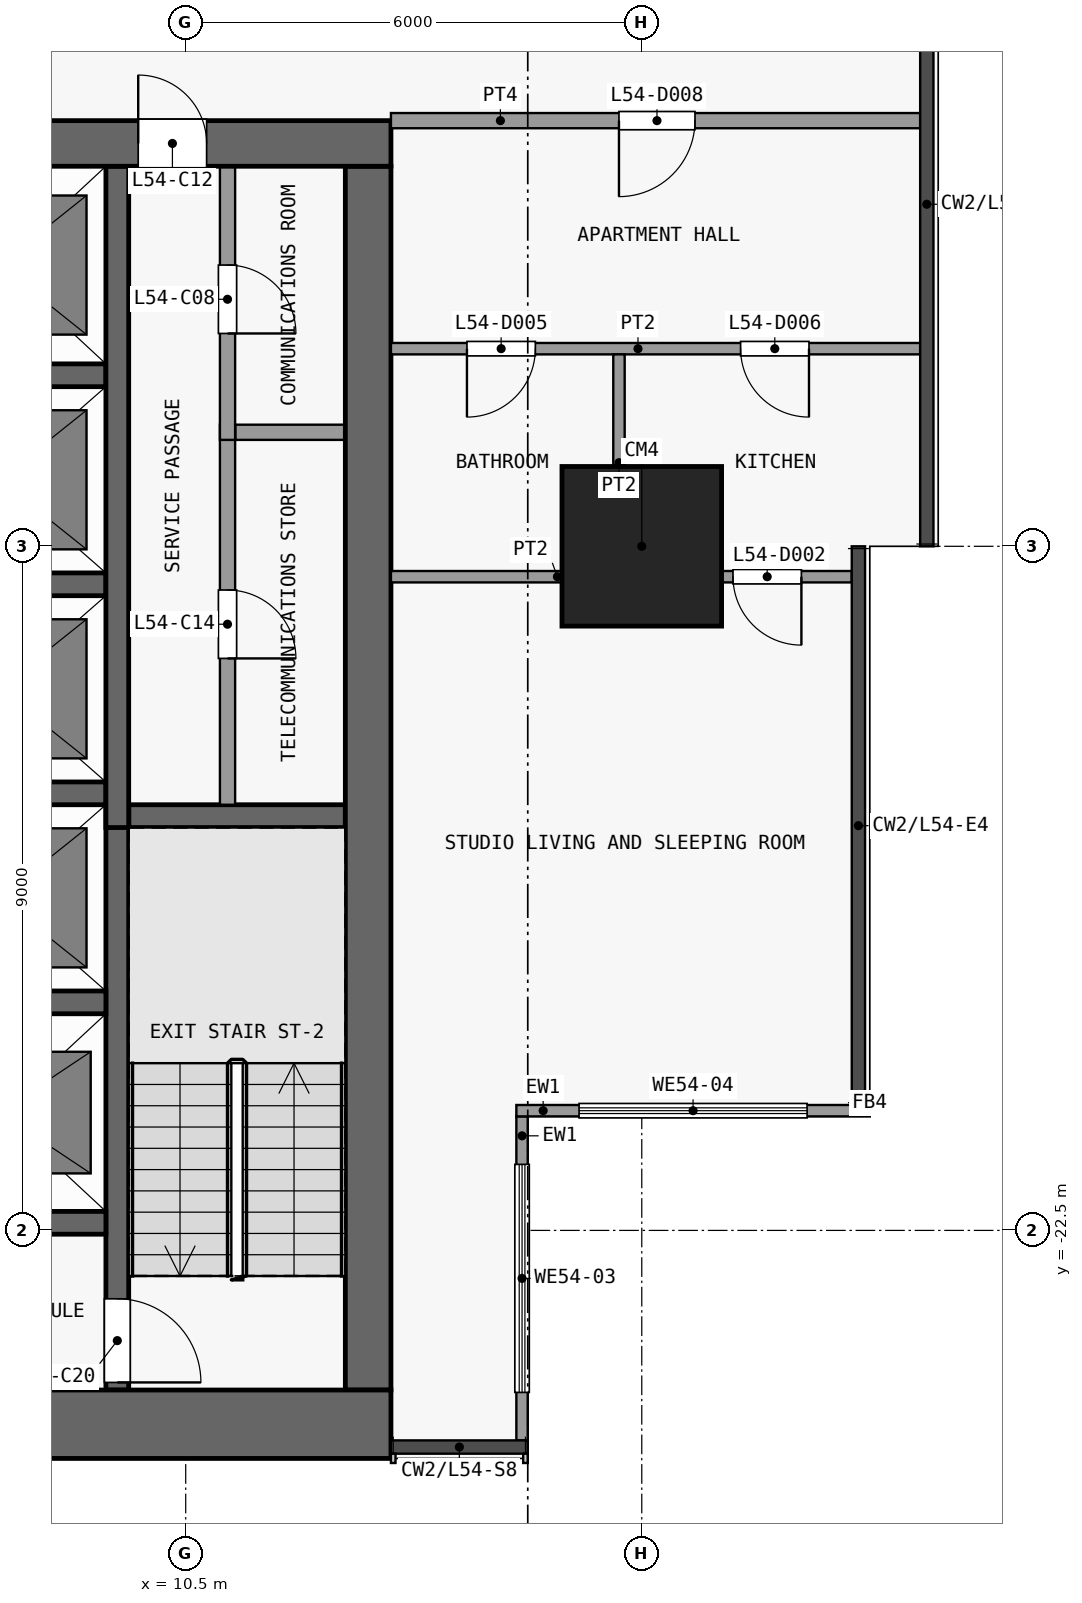
"""IFC4 building model, lengths in metres.
Left out: names, types, materials, properties, quantities, classifications, styles, units other than length and angle.
Written with IfcOpenShell. Run it as: python <this file> out.ifc"""

import sys

from ifc_helpers import new_model, si_unit, direction, frame, frame_2d, origin, origin_2d, place, context, subcontext, project, spatial, rectangle, extrude, element, fill, save


model = new_model("IFC4")
c1 = context("Model", 3, precision=1e-05, world=origin(), true_north=direction((0.0, 1.0)))
c2 = subcontext(c1, "Body", "Model", "MODEL_VIEW")
j1 = project(units=[si_unit("LENGTHUNIT", "METRE"), si_unit("PLANEANGLEUNIT", "RADIAN")], contexts=[c1])
p1 = place(None, origin())
s1 = spatial("IfcSite", under=j1, at=p1, CompositionType="ELEMENT")
p2 = place(p1, origin())
s2 = spatial("IfcBuilding", under=s1, at=p2, CompositionType="ELEMENT")
p3 = place(p2, frame((0.0, 0.0, 215.9)))
s3 = spatial("IfcBuildingStorey", under=s2, at=p3, CompositionType="ELEMENT", Elevation=215.9)
p4 = place(p3, frame((16.5, -13.5, 0.0), z_axis=(0.0, 0.0, 1.0), x_axis=(1.0, 0.0, 0.0)))
e1 = element("IfcColumn", 1, at=p4, inside=s3, PredefinedType="COLUMN", context=c2, shape_type="SweptSolid", body=[
    extrude(rectangle(XDim=2.1, YDim=2.1, at=origin_2d()), origin(), (0.0, 0.0, 1.0), 3.6),
])
p5 = place(p3, frame((-13.2, -25.05, 0.0), z_axis=(0.0, 0.0, 1.0), x_axis=(1.0, 0.0, 0.0)))
e2 = element("IfcWall", 2, at=p5, inside=s3, PredefinedType="SHEAR", context=c2, shape_type="SweptSolid", body=[
    extrude(rectangle(XDim=26.4, YDim=0.9, at=frame_2d((13.2, 0.0))), origin(), (0.0, 0.0, 1.0), 3.3),
])
p6 = place(p3, frame((-13.2, -8.2, 0.0), z_axis=(0.0, 0.0, 1.0), x_axis=(1.0, 0.0, 0.0)))
e3 = element("IfcWall", 3, at=p6, inside=s3, PredefinedType="SHEAR", context=c2, shape_type="SweptSolid", body=[
    extrude(rectangle(XDim=26.4, YDim=0.6, at=frame_2d((13.2, 0.0))), origin(), (0.0, 0.0, 1.0), 3.3),
])
p7 = place(p6, frame((7.5, 0.0, 0.0)))
e4 = element("IfcOpeningElement", 4, at=p7, cuts=e3, PredefinedType="OPENING", context=c2, shape_type="SweptSolid", body=[
    extrude(rectangle(XDim=1.8, YDim=2.1, at=frame_2d((0.9, 1.05))), frame((0.0, 0.31, 0.0), z_axis=(0.0, -1.0, 0.0), x_axis=(1.0, 0.0, 0.0)), (0.0, 0.0, 1.0), 0.62),
])
p8 = place(p6, frame((17.1, 0.0, 0.0)))
e5 = element("IfcOpeningElement", 5, at=p8, cuts=e3, PredefinedType="OPENING", context=c2, shape_type="SweptSolid", body=[
    extrude(rectangle(XDim=1.8, YDim=2.1, at=frame_2d((0.9, 1.05))), frame((0.0, 0.31, 0.0), z_axis=(0.0, -1.0, 0.0), x_axis=(1.0, 0.0, 0.0)), (0.0, 0.0, 1.0), 0.62),
])
p9 = place(p6, frame((2.425, 0.0, 0.0)))
e6 = element("IfcOpeningElement", 6, at=p9, cuts=e3, PredefinedType="OPENING", context=c2, shape_type="SweptSolid", body=[
    extrude(rectangle(XDim=0.9, YDim=2.1, at=frame_2d((0.45, 1.05))), frame((0.0, 0.31, 0.0), z_axis=(0.0, -1.0, 0.0), x_axis=(1.0, 0.0, 0.0)), (0.0, 0.0, 1.0), 0.62),
])
p10 = place(p6, frame((23.075, 0.0, 0.0)))
e7 = element("IfcOpeningElement", 7, at=p10, cuts=e3, PredefinedType="OPENING", context=c2, shape_type="SweptSolid", body=[
    extrude(rectangle(XDim=0.9, YDim=2.1, at=frame_2d((0.45, 1.05))), frame((0.0, 0.31, 0.0), z_axis=(0.0, -1.0, 0.0), x_axis=(1.0, 0.0, 0.0)), (0.0, 0.0, 1.0), 0.62),
])
p11 = place(p3, frame((12.9, -24.6, 0.0), z_axis=(0.0, 0.0, 1.0), x_axis=(0.0, 1.0, 0.0)))
e8 = element("IfcWall", 8, at=p11, inside=s3, PredefinedType="SHEAR", context=c2, shape_type="SweptSolid", body=[
    extrude(rectangle(XDim=16.1, YDim=0.6, at=frame_2d((8.05, 0.0))), origin(), (0.0, 0.0, 1.0), 3.3),
])
for number, where, z_axis, x_axis in (
    (9, (6.65, -22.4, 0.0), (0.0, 0.0, 1.0), (1.0, 0.0, 0.0)),
    (10, (6.65, -19.5, 0.0), (0.0, 0.0, 1.0), (1.0, 0.0, 0.0)),
):
    element("IfcWall", number, at=place(p3, frame(where, z_axis=z_axis, x_axis=x_axis)), inside=s3, PredefinedType="SHEAR", context=c2, shape_type="SweptSolid", body=[
        extrude(rectangle(XDim=2.8, YDim=0.3, at=frame_2d((1.4, 0.0))), origin(), (0.0, 0.0, 1.0), 3.3),
    ])
p12 = place(p3, frame((9.75, -17.05, 0.0), z_axis=(0.0, 0.0, 1.0), x_axis=(1.0, 0.0, 0.0)))
e11 = element("IfcWall", 11, at=p12, inside=s3, PredefinedType="SHEAR", context=c2, shape_type="SweptSolid", body=[
    extrude(rectangle(XDim=2.85, YDim=0.3, at=frame_2d((1.425, 0.0))), origin(), (0.0, 0.0, 1.0), 3.3),
])
for number, where, z_axis, x_axis in (
    (12, (6.65, -16.75, 0.0), (0.0, 0.0, 1.0), (1.0, 0.0, 0.0)),
    (13, (6.65, -14.0, 0.0), (0.0, 0.0, 1.0), (1.0, 0.0, 0.0)),
):
    element("IfcWall", number, at=place(p3, frame(where, z_axis=z_axis, x_axis=x_axis)), inside=s3, PredefinedType="SHEAR", context=c2, shape_type="SweptSolid", body=[
        extrude(rectangle(XDim=2.8, YDim=0.3, at=frame_2d((1.4, 0.0))), origin(), (0.0, 0.0, 1.0), 3.3),
    ])
p13 = place(p3, frame((11.15, -12.0, 0.0), z_axis=(0.0, 0.0, 1.0), x_axis=(1.0, 0.0, 0.0)))
e14 = element("IfcWall", 14, at=p13, inside=s3, PredefinedType="PARTITIONING", context=c2, shape_type="SweptSolid", body=[
    extrude(rectangle(XDim=1.45, YDim=0.2, at=frame_2d((0.725, 0.0))), origin(), (0.0, 0.0, 1.0), 3.3),
])
p14 = place(p3, frame((6.65, -11.25, 0.0), z_axis=(0.0, 0.0, 1.0), x_axis=(1.0, 0.0, 0.0)))
e15 = element("IfcWall", 15, at=p14, inside=s3, PredefinedType="SHEAR", context=c2, shape_type="SweptSolid", body=[
    extrude(rectangle(XDim=2.8, YDim=0.3, at=frame_2d((1.4, 0.0))), origin(), (0.0, 0.0, 1.0), 3.3),
])
p15 = place(p3, frame((9.6, -16.9, 0.0), z_axis=(0.0, 0.0, 1.0), x_axis=(0.0, -1.0, 0.0)))
e16 = element("IfcWall", 16, at=p15, inside=s3, PredefinedType="SHEAR", context=c2, shape_type="SweptSolid", body=[
    extrude(rectangle(XDim=7.7, YDim=0.3, at=frame_2d((3.85, 0.0))), origin(), (0.0, 0.0, 1.0), 3.3),
])
p16 = place(p15, frame((6.5, 0.0, 0.0)))
e17 = element("IfcOpeningElement", 17, at=p16, cuts=e16, PredefinedType="OPENING", context=c2, shape_type="SweptSolid", body=[
    extrude(rectangle(XDim=1.1, YDim=2.1, at=frame_2d((0.55, 1.05))), frame((0.0, 0.16, 0.0), z_axis=(0.0, -1.0, 0.0), x_axis=(1.0, 0.0, 0.0)), (0.0, 0.0, 1.0), 0.32),
])
p17 = place(p3, frame((9.6, -17.2, 0.0), z_axis=(0.0, 0.0, 1.0), x_axis=(0.0, 1.0, 0.0)))
e18 = element("IfcWall", 18, at=p17, inside=s3, PredefinedType="SHEAR", context=c2, shape_type="SweptSolid", body=[
    extrude(rectangle(XDim=8.7, YDim=0.3, at=frame_2d((4.35, 0.0))), origin(), (0.0, 0.0, 1.0), 3.3),
])
p18 = place(p3, frame((11.05, -11.9, 0.0), z_axis=(0.0, 0.0, 1.0), x_axis=(0.0, -1.0, 0.0)))
e19 = element("IfcWall", 19, at=p18, inside=s3, PredefinedType="PARTITIONING", context=c2, shape_type="SweptSolid", body=[
    extrude(rectangle(XDim=5.0, YDim=0.2, at=frame_2d((2.5, 0.0))), origin(), (0.0, 0.0, 1.0), 3.3),
])
p19 = place(p18, frame((2.175, 0.0, 0.0)))
e20 = element("IfcOpeningElement", 20, at=p19, cuts=e19, PredefinedType="OPENING", context=c2, shape_type="SweptSolid", body=[
    extrude(rectangle(XDim=0.9, YDim=2.1, at=frame_2d((0.45, 1.05))), frame((0.0, 0.11, 0.0), z_axis=(0.0, -1.0, 0.0), x_axis=(1.0, 0.0, 0.0)), (0.0, 0.0, 1.0), 0.22),
])
p20 = place(p3, frame((11.05, -8.5, 0.0), z_axis=(0.0, 0.0, 1.0), x_axis=(0.0, -1.0, 0.0)))
e21 = element("IfcWall", 21, at=p20, inside=s3, PredefinedType="PARTITIONING", context=c2, shape_type="SweptSolid", body=[
    extrude(rectangle(XDim=3.6, YDim=0.2, at=frame_2d((1.8, 0.0))), origin(), (0.0, 0.0, 1.0), 3.3),
])
p21 = place(p20, frame((1.3, 0.0, 0.0)))
e22 = element("IfcOpeningElement", 22, at=p21, cuts=e21, PredefinedType="OPENING", context=c2, shape_type="SweptSolid", body=[
    extrude(rectangle(XDim=0.9, YDim=2.1, at=frame_2d((0.45, 1.05))), frame((0.0, 0.11, 0.0), z_axis=(0.0, -1.0, 0.0), x_axis=(1.0, 0.0, 0.0)), (0.0, 0.0, 1.0), 0.22),
])
p22 = place(p3, frame((14.925, -21.0, 0.0), z_axis=(0.0, 0.0, 1.0), x_axis=(0.0, -1.0, 0.0)))
e23 = element("IfcWall", 23, at=p22, inside=s3, PredefinedType="SOLIDWALL", context=c2, shape_type="SweptSolid", body=[
    extrude(rectangle(XDim=4.262, YDim=0.15, at=frame_2d((2.131, 0.0))), origin(), (0.0, 0.0, 1.0), 3.3),
])
p23 = place(p22, frame((0.631, 0.0, 0.9)))
e24 = element("IfcOpeningElement", 24, at=p23, cuts=e23, PredefinedType="OPENING", context=c2, shape_type="SweptSolid", body=[
    extrude(rectangle(XDim=3.0, YDim=2.4, at=frame_2d((1.5, 1.2))), frame((0.0, 0.085, 0.0), z_axis=(0.0, -1.0, 0.0), x_axis=(1.0, 0.0, 0.0)), (0.0, 0.0, 1.0), 0.17),
])
p24 = place(p3, frame((19.5, -20.925, 0.0), z_axis=(0.0, 0.0, 1.0), x_axis=(-1.0, 0.0, 0.0)))
e25 = element("IfcWall", 25, at=p24, inside=s3, PredefinedType="SOLIDWALL", context=c2, shape_type="SweptSolid", body=[
    extrude(rectangle(XDim=4.65, YDim=0.15, at=frame_2d((2.325, 0.0))), origin(), (0.0, 0.0, 1.0), 3.3),
])
p25 = place(p24, frame((0.825, 0.0, 0.9)))
e26 = element("IfcOpeningElement", 26, at=p25, cuts=e25, PredefinedType="OPENING", context=c2, shape_type="SweptSolid", body=[
    extrude(rectangle(XDim=3.0, YDim=2.4, at=frame_2d((1.5, 1.2))), frame((0.0, 0.085, 0.0), z_axis=(0.0, -1.0, 0.0), x_axis=(1.0, 0.0, 0.0)), (0.0, 0.0, 1.0), 0.17),
])
p26 = place(p3, frame((13.2, -13.9, 0.0), z_axis=(0.0, 0.0, 1.0), x_axis=(1.0, 0.0, 0.0)))
e27 = element("IfcWall", 27, at=p26, inside=s3, PredefinedType="PARTITIONING", context=c2, shape_type="SweptSolid", body=[
    extrude(rectangle(XDim=6.062, YDim=0.15, at=frame_2d((3.031, 0.0))), origin(), (0.0, 0.0, 1.0), 3.3),
])
p27 = place(p26, frame((4.5, 0.0, 0.0)))
e28 = element("IfcOpeningElement", 28, at=p27, cuts=e27, PredefinedType="OPENING", context=c2, shape_type="SweptSolid", body=[
    extrude(rectangle(XDim=0.9, YDim=2.1, at=frame_2d((0.45, 1.05))), frame((0.0, 0.085, 0.0), z_axis=(0.0, -1.0, 0.0), x_axis=(1.0, 0.0, 0.0)), (0.0, 0.0, 1.0), 0.17),
])
p28 = place(p3, frame((13.2, -10.9, 0.0), z_axis=(0.0, 0.0, 1.0), x_axis=(1.0, 0.0, 0.0)))
e29 = element("IfcWall", 29, at=p28, inside=s3, PredefinedType="PARTITIONING", context=c2, shape_type="SweptSolid", body=[
    extrude(rectangle(XDim=6.963, YDim=0.15, at=frame_2d((3.481, 0.0))), origin(), (0.0, 0.0, 1.0), 3.3),
])
p29 = place(p28, frame((1.0, 0.0, 0.0)))
e30 = element("IfcOpeningElement", 30, at=p29, cuts=e29, PredefinedType="OPENING", context=c2, shape_type="SweptSolid", body=[
    extrude(rectangle(XDim=0.9, YDim=2.1, at=frame_2d((0.45, 1.05))), frame((0.0, 0.085, 0.0), z_axis=(0.0, -1.0, 0.0), x_axis=(1.0, 0.0, 0.0)), (0.0, 0.0, 1.0), 0.17),
])
p30 = place(p28, frame((4.6, 0.0, 0.0)))
e31 = element("IfcOpeningElement", 31, at=p30, cuts=e29, PredefinedType="OPENING", context=c2, shape_type="SweptSolid", body=[
    extrude(rectangle(XDim=0.9, YDim=2.1, at=frame_2d((0.45, 1.05))), frame((0.0, 0.085, 0.0), z_axis=(0.0, -1.0, 0.0), x_axis=(1.0, 0.0, 0.0)), (0.0, 0.0, 1.0), 0.17),
])
p31 = place(p3, frame((13.2, -7.9, 0.0), z_axis=(0.0, 0.0, 1.0), x_axis=(1.0, 0.0, 0.0)))
e32 = element("IfcWall", 32, at=p31, inside=s3, PredefinedType="PARTITIONING", context=c2, shape_type="SweptSolid", body=[
    extrude(rectangle(XDim=6.963, YDim=0.2, at=frame_2d((3.481, 0.0))), origin(), (0.0, 0.0, 1.0), 3.3),
])
p32 = place(p31, frame((3.0, 0.0, 0.0)))
e33 = element("IfcOpeningElement", 33, at=p32, cuts=e32, PredefinedType="OPENING", context=c2, shape_type="SweptSolid", body=[
    extrude(rectangle(XDim=1.0, YDim=2.1, at=frame_2d((0.5, 1.05))), frame((0.0, 0.11, 0.0), z_axis=(0.0, -1.0, 0.0), x_axis=(1.0, 0.0, 0.0)), (0.0, 0.0, 1.0), 0.22),
])
p33 = place(p3, frame((16.2, -13.825, 0.0), z_axis=(0.0, 0.0, 1.0), x_axis=(0.0, 1.0, 0.0)))
e34 = element("IfcWall", 34, at=p33, inside=s3, PredefinedType="PARTITIONING", context=c2, shape_type="SweptSolid", body=[
    extrude(rectangle(XDim=2.85, YDim=0.15, at=frame_2d((1.425, 0.0))), origin(), (0.0, 0.0, 1.0), 3.3),
])
p34 = place(p21, origin())
e35 = element("IfcDoor", 35, at=p34, inside=s3, OperationType="SINGLE_SWING_RIGHT", PredefinedType="DOOR", context=c2, shape_type="SweptSolid", body=[
    extrude(rectangle(XDim=0.9, YDim=2.1, at=frame_2d((0.45, 1.05))), frame((0.0, 0.025, 0.0), z_axis=(0.0, -1.0, 0.0), x_axis=(1.0, 0.0, 0.0)), (0.0, 0.0, 1.0), 0.05),
])
fill(e22, e35)
p35 = place(p10, origin())
e36 = element("IfcDoor", 36, at=p35, inside=s3, OperationType="SINGLE_SWING_LEFT", PredefinedType="DOOR", context=c2, shape_type="SweptSolid", body=[
    extrude(rectangle(XDim=0.9, YDim=2.1, at=frame_2d((0.45, 1.05))), frame((0.0, 0.025, 0.0), z_axis=(0.0, -1.0, 0.0), x_axis=(1.0, 0.0, 0.0)), (0.0, 0.0, 1.0), 0.05),
])
fill(e7, e36)
p36 = place(p19, origin())
e37 = element("IfcDoor", 37, at=p36, inside=s3, OperationType="SINGLE_SWING_RIGHT", PredefinedType="DOOR", context=c2, shape_type="SweptSolid", body=[
    extrude(rectangle(XDim=0.9, YDim=2.1, at=frame_2d((0.45, 1.05))), frame((0.0, 0.025, 0.0), z_axis=(0.0, -1.0, 0.0), x_axis=(1.0, 0.0, 0.0)), (0.0, 0.0, 1.0), 0.05),
])
fill(e20, e37)
p37 = place(p16, origin())
e38 = element("IfcDoor", 38, at=p37, inside=s3, OperationType="SINGLE_SWING_RIGHT", PredefinedType="DOOR", context=c2, shape_type="SweptSolid", body=[
    extrude(rectangle(XDim=1.1, YDim=2.1, at=frame_2d((0.55, 1.05))), frame((0.0, 0.025, 0.0), z_axis=(0.0, -1.0, 0.0), x_axis=(1.0, 0.0, 0.0)), (0.0, 0.0, 1.0), 0.05),
])
fill(e17, e38)
p38 = place(p23, origin())
e39 = element("IfcWindow", 39, at=p38, inside=s3, PartitioningType="SINGLE_PANEL", PredefinedType="WINDOW", context=c2, shape_type="SweptSolid", body=[
    extrude(rectangle(XDim=3.0, YDim=2.4, at=frame_2d((1.5, 1.2))), frame((0.0, 0.03, 0.0), z_axis=(0.0, -1.0, 0.0), x_axis=(1.0, 0.0, 0.0)), (0.0, 0.0, 1.0), 0.06),
])
fill(e24, e39)
p39 = place(p25, origin())
e40 = element("IfcWindow", 40, at=p39, inside=s3, PartitioningType="SINGLE_PANEL", PredefinedType="WINDOW", context=c2, shape_type="SweptSolid", body=[
    extrude(rectangle(XDim=3.0, YDim=2.4, at=frame_2d((1.5, 1.2))), frame((0.0, 0.03, 0.0), z_axis=(0.0, -1.0, 0.0), x_axis=(1.0, 0.0, 0.0)), (0.0, 0.0, 1.0), 0.06),
])
fill(e26, e40)
p40 = place(p27, origin())
e41 = element("IfcDoor", 41, at=p40, inside=s3, OperationType="SINGLE_SWING_RIGHT", PredefinedType="DOOR", context=c2, shape_type="SweptSolid", body=[
    extrude(rectangle(XDim=0.9, YDim=2.1, at=frame_2d((0.45, 1.05))), frame((0.0, 0.025, 0.0), z_axis=(0.0, -1.0, 0.0), x_axis=(1.0, 0.0, 0.0)), (0.0, 0.0, 1.0), 0.05),
])
fill(e28, e41)
p41 = place(p29, origin())
e42 = element("IfcDoor", 42, at=p41, inside=s3, OperationType="SINGLE_SWING_LEFT", PredefinedType="DOOR", context=c2, shape_type="SweptSolid", body=[
    extrude(rectangle(XDim=0.9, YDim=2.1, at=frame_2d((0.45, 1.05))), frame((0.0, 0.025, 0.0), z_axis=(0.0, -1.0, 0.0), x_axis=(1.0, 0.0, 0.0)), (0.0, 0.0, 1.0), 0.05),
])
fill(e30, e42)
p42 = place(p30, origin())
e43 = element("IfcDoor", 43, at=p42, inside=s3, OperationType="SINGLE_SWING_RIGHT", PredefinedType="DOOR", context=c2, shape_type="SweptSolid", body=[
    extrude(rectangle(XDim=0.9, YDim=2.1, at=frame_2d((0.45, 1.05))), frame((0.0, 0.025, 0.0), z_axis=(0.0, -1.0, 0.0), x_axis=(1.0, 0.0, 0.0)), (0.0, 0.0, 1.0), 0.05),
])
fill(e31, e43)
p43 = place(p32, origin())
e44 = element("IfcDoor", 44, at=p43, inside=s3, OperationType="SINGLE_SWING_LEFT", PredefinedType="DOOR", context=c2, shape_type="SweptSolid", body=[
    extrude(rectangle(XDim=1.0, YDim=2.1, at=frame_2d((0.5, 1.05))), frame((0.0, 0.025, 0.0), z_axis=(0.0, -1.0, 0.0), x_axis=(1.0, 0.0, 0.0)), (0.0, 0.0, 1.0), 0.05),
])
fill(e33, e44)
save(model, sys.argv[1])
